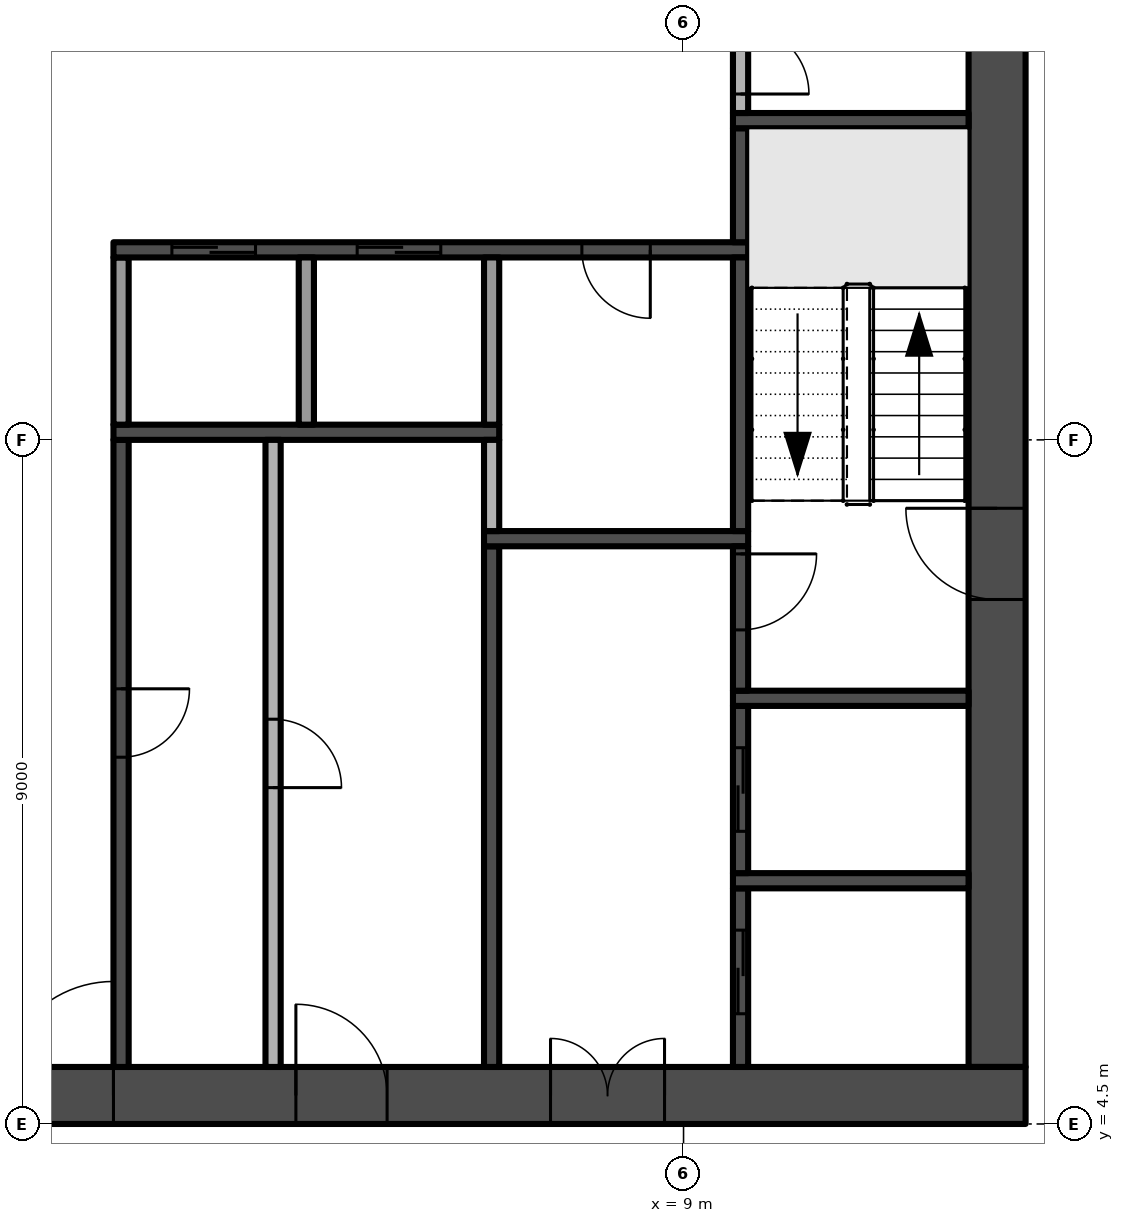
"""IFC4 building model, lengths in metres.
Left out: names, types, materials, properties, quantities, classifications, styles, units other than length and angle.
Written with IfcOpenShell. Run it as: python <this file> out.ifc"""

import sys

from ifc_helpers import new_model, si_unit, direction, frame, frame_2d, origin, place, context, subcontext, project, spatial, rectangle, extrude, element, fill, save


model = new_model("IFC4")
c1 = context("Model", 3, precision=1e-05, world=origin(), true_north=direction((0.0, 1.0)))
c2 = subcontext(c1, "Body", "Model", "MODEL_VIEW")
j1 = project(units=[si_unit("LENGTHUNIT", "METRE"), si_unit("PLANEANGLEUNIT", "RADIAN")], contexts=[c1])
p1 = place(None, origin())
s1 = spatial("IfcSite", under=j1, at=p1, CompositionType="ELEMENT")
p2 = place(p1, origin())
s2 = spatial("IfcBuilding", under=s1, at=p2, CompositionType="ELEMENT")
p3 = place(p2, frame((0.0, 0.0, 163.0)))
s3 = spatial("IfcBuildingStorey", under=s2, at=p3, CompositionType="ELEMENT", Elevation=163.0)
p4 = place(p3, frame((-13.5, 4.875, -0.3), z_axis=(0.0, 0.0, 1.0), x_axis=(1.0, 0.0, 0.0)))
e1 = element("IfcWall", 1, at=p4, inside=s3, PredefinedType="SHEAR", context=c2, shape_type="SweptSolid", body=[
    extrude(rectangle(XDim=27.0, YDim=0.75, at=frame_2d((13.5, 0.0))), origin(), (0.0, 0.0, 1.0), 3.8),
])
p5 = place(p4, frame((12.0, 0.0, 0.3)))
e2 = element("IfcOpeningElement", 2, at=p5, cuts=e1, PredefinedType="OPENING", context=c2, shape_type="SweptSolid", body=[
    extrude(rectangle(XDim=3.0, YDim=2.4, at=frame_2d((1.5, 1.2))), frame((0.0, 0.385, 0.0), z_axis=(0.0, -1.0, 0.0), x_axis=(1.0, 0.0, 0.0)), (0.0, 0.0, 1.0), 0.77),
])
p6 = place(p4, frame((4.9, 0.0, 0.3)))
e3 = element("IfcOpeningElement", 3, at=p6, cuts=e1, PredefinedType="OPENING", context=c2, shape_type="SweptSolid", body=[
    extrude(rectangle(XDim=1.2, YDim=2.2, at=frame_2d((0.6, 1.1))), frame((0.0, 0.385, 0.0), z_axis=(0.0, -1.0, 0.0), x_axis=(1.0, 0.0, 0.0)), (0.0, 0.0, 1.0), 0.77),
])
p7 = place(p4, frame((20.75, 0.0, 0.3)))
e4 = element("IfcOpeningElement", 4, at=p7, cuts=e1, PredefinedType="OPENING", context=c2, shape_type="SweptSolid", body=[
    extrude(rectangle(XDim=1.5, YDim=2.2, at=frame_2d((0.75, 1.1))), frame((0.0, 0.385, 0.0), z_axis=(0.0, -1.0, 0.0), x_axis=(1.0, 0.0, 0.0)), (0.0, 0.0, 1.0), 0.77),
])
p8 = place(p4, frame((17.4, 0.0, 0.3)))
e5 = element("IfcOpeningElement", 5, at=p8, cuts=e1, PredefinedType="OPENING", context=c2, shape_type="SweptSolid", body=[
    extrude(rectangle(XDim=1.2, YDim=2.2, at=frame_2d((0.6, 1.1))), frame((0.0, 0.385, 0.0), z_axis=(0.0, -1.0, 0.0), x_axis=(1.0, 0.0, 0.0)), (0.0, 0.0, 1.0), 0.77),
])
p9 = place(p3, frame((13.125, 5.25, -0.3), z_axis=(0.0, 0.0, 1.0), x_axis=(0.0, 1.0, 0.0)))
e6 = element("IfcWall", 6, at=p9, inside=s3, PredefinedType="SHEAR", context=c2, shape_type="SweptSolid", body=[
    extrude(rectangle(XDim=16.5, YDim=0.75, at=frame_2d((8.25, 0.0))), origin(), (0.0, 0.0, 1.0), 3.8),
])
p10 = place(p9, frame((6.15, 0.0, 0.3)))
e7 = element("IfcOpeningElement", 7, at=p10, cuts=e6, PredefinedType="OPENING", context=c2, shape_type="SweptSolid", body=[
    extrude(rectangle(XDim=1.2, YDim=2.2, at=frame_2d((0.6, 1.1))), frame((0.0, 0.385, 0.0), z_axis=(0.0, -1.0, 0.0), x_axis=(1.0, 0.0, 0.0)), (0.0, 0.0, 1.0), 0.77),
])
p11 = place(p3, frame((1.6, 13.5, 0.0), z_axis=(0.0, 0.0, 1.0), x_axis=(0.0, -1.0, 0.0)))
e8 = element("IfcWall", 8, at=p11, inside=s3, PredefinedType="SHEAR", context=c2, shape_type="SweptSolid", body=[
    extrude(rectangle(XDim=8.25, YDim=0.2, at=frame_2d((4.125, 0.0))), origin(), (0.0, 0.0, 1.0), 3.5),
])
p12 = place(p11, frame((3.275, 0.0, 0.0)))
e9 = element("IfcOpeningElement", 9, at=p12, cuts=e8, PredefinedType="OPENING", context=c2, shape_type="SweptSolid", body=[
    extrude(rectangle(XDim=0.9, YDim=2.1, at=frame_2d((0.45, 1.05))), frame((0.0, 0.11, 0.0), z_axis=(0.0, -1.0, 0.0), x_axis=(1.0, 0.0, 0.0)), (0.0, 0.0, 1.0), 0.22),
])
p13 = place(p3, frame((1.5, 13.6, 0.0), z_axis=(0.0, 0.0, 1.0), x_axis=(1.0, 0.0, 0.0)))
e10 = element("IfcWall", 10, at=p13, inside=s3, PredefinedType="SHEAR", context=c2, shape_type="SweptSolid", body=[
    extrude(rectangle(XDim=5.075, YDim=0.2, at=frame_2d((2.538, 0.0))), origin(), (0.0, 0.0, 1.0), 3.5),
])
p14 = place(p3, frame((1.6, 13.7, 0.0), z_axis=(0.0, 0.0, 1.0), x_axis=(0.0, 1.0, 0.0)))
e11 = element("IfcWall", 11, at=p14, inside=s3, PredefinedType="PARTITIONING", context=c2, shape_type="SweptSolid", body=[
    extrude(rectangle(XDim=2.2, YDim=0.2, at=frame_2d((1.1, 0.0))), origin(), (0.0, 0.0, 1.0), 3.5),
])
p15 = place(p3, frame((9.85, 16.0, 0.0), z_axis=(0.0, 0.0, 1.0), x_axis=(-1.0, 0.0, 0.0)))
e12 = element("IfcWall", 12, at=p15, inside=s3, PredefinedType="SHEAR", context=c2, shape_type="SweptSolid", body=[
    extrude(rectangle(XDim=8.35, YDim=0.2, at=frame_2d((4.175, 0.0))), origin(), (0.0, 0.0, 1.0), 3.5),
])
p16 = place(p15, frame((6.481, 0.0, 0.0)))
e13 = element("IfcOpeningElement", 13, at=p16, cuts=e12, PredefinedType="OPENING", context=c2, shape_type="SweptSolid", body=[
    extrude(rectangle(XDim=1.1, YDim=2.1, at=frame_2d((0.55, 1.05))), frame((0.0, 0.11, 0.0), z_axis=(0.0, -1.0, 0.0), x_axis=(1.0, 0.0, 0.0)), (0.0, 0.0, 1.0), 0.22),
])
p17 = place(p15, frame((4.044, 0.0, 0.0)))
e14 = element("IfcOpeningElement", 14, at=p17, cuts=e12, PredefinedType="OPENING", context=c2, shape_type="SweptSolid", body=[
    extrude(rectangle(XDim=1.1, YDim=2.1, at=frame_2d((0.55, 1.05))), frame((0.0, 0.11, 0.0), z_axis=(0.0, -1.0, 0.0), x_axis=(1.0, 0.0, 0.0)), (0.0, 0.0, 1.0), 0.22),
])
p18 = place(p15, frame((1.288, 0.0, 0.0)))
e15 = element("IfcOpeningElement", 15, at=p18, cuts=e12, PredefinedType="OPENING", context=c2, shape_type="SweptSolid", body=[
    extrude(rectangle(XDim=0.9, YDim=2.1, at=frame_2d((0.45, 1.05))), frame((0.0, 0.11, 0.0), z_axis=(0.0, -1.0, 0.0), x_axis=(1.0, 0.0, 0.0)), (0.0, 0.0, 1.0), 0.22),
])
p19 = place(p3, frame((3.6, 13.5, 0.0), z_axis=(0.0, 0.0, 1.0), x_axis=(0.0, -1.0, 0.0)))
e16 = element("IfcWall", 16, at=p19, inside=s3, PredefinedType="PARTITIONING", context=c2, shape_type="SweptSolid", body=[
    extrude(rectangle(XDim=8.25, YDim=0.2, at=frame_2d((4.125, 0.0))), origin(), (0.0, 0.0, 1.0), 3.5),
])
p20 = place(p19, frame((3.675, 0.0, 0.0)))
e17 = element("IfcOpeningElement", 17, at=p20, cuts=e16, PredefinedType="OPENING", context=c2, shape_type="SweptSolid", body=[
    extrude(rectangle(XDim=0.9, YDim=2.1, at=frame_2d((0.45, 1.05))), frame((0.0, 0.11, 0.0), z_axis=(0.0, -1.0, 0.0), x_axis=(1.0, 0.0, 0.0)), (0.0, 0.0, 1.0), 0.22),
])
p21 = place(p3, frame((4.037, 13.7, 0.0), z_axis=(0.0, 0.0, 1.0), x_axis=(0.0, 1.0, 0.0)))
e18 = element("IfcWall", 18, at=p21, inside=s3, PredefinedType="PARTITIONING", context=c2, shape_type="SweptSolid", body=[
    extrude(rectangle(XDim=2.2, YDim=0.2, at=frame_2d((1.1, 0.0))), origin(), (0.0, 0.0, 1.0), 3.5),
])
p22 = place(p3, frame((6.475, 5.25, 0.0), z_axis=(0.0, 0.0, 1.0), x_axis=(0.0, 1.0, 0.0)))
e19 = element("IfcWall", 19, at=p22, inside=s3, PredefinedType="SHEAR", context=c2, shape_type="SweptSolid", body=[
    extrude(rectangle(XDim=6.85, YDim=0.2, at=frame_2d((3.425, 0.0))), origin(), (0.0, 0.0, 1.0), 3.5),
])
p23 = place(p3, frame((6.375, 12.2, 0.0), z_axis=(0.0, 0.0, 1.0), x_axis=(1.0, 0.0, 0.0)))
e20 = element("IfcWall", 20, at=p23, inside=s3, PredefinedType="SHEAR", context=c2, shape_type="SweptSolid", body=[
    extrude(rectangle(XDim=3.475, YDim=0.2, at=frame_2d((1.738, 0.0))), origin(), (0.0, 0.0, 1.0), 3.5),
])
p24 = place(p3, frame((6.475, 12.3, 0.0), z_axis=(0.0, 0.0, 1.0), x_axis=(0.0, 1.0, 0.0)))
e21 = element("IfcWall", 21, at=p24, inside=s3, PredefinedType="PARTITIONING", context=c2, shape_type="SweptSolid", body=[
    extrude(rectangle(XDim=1.2, YDim=0.2, at=frame_2d((0.6, 0.0))), origin(), (0.0, 0.0, 1.0), 3.5),
])
p25 = place(p3, frame((6.475, 13.7, 0.0), z_axis=(0.0, 0.0, 1.0), x_axis=(0.0, 1.0, 0.0)))
e22 = element("IfcWall", 22, at=p25, inside=s3, PredefinedType="PARTITIONING", context=c2, shape_type="SweptSolid", body=[
    extrude(rectangle(XDim=2.2, YDim=0.2, at=frame_2d((1.1, 0.0))), origin(), (0.0, 0.0, 1.0), 3.5),
])
p26 = place(p3, frame((9.75, 5.25, 0.0), z_axis=(0.0, 0.0, 1.0), x_axis=(0.0, 1.0, 0.0)))
e23 = element("IfcWall", 23, at=p26, inside=s3, PredefinedType="SHEAR", context=c2, shape_type="SweptSolid", body=[
    extrude(rectangle(XDim=2.35, YDim=0.2, at=frame_2d((1.175, 0.0))), origin(), (0.0, 0.0, 1.0), 3.5),
])
p27 = place(p26, frame((0.7, 0.0, 0.0)))
e24 = element("IfcOpeningElement", 24, at=p27, cuts=e23, PredefinedType="OPENING", context=c2, shape_type="SweptSolid", body=[
    extrude(rectangle(XDim=1.1, YDim=2.1, at=frame_2d((0.55, 1.05))), frame((0.0, 0.11, 0.0), z_axis=(0.0, -1.0, 0.0), x_axis=(1.0, 0.0, 0.0)), (0.0, 0.0, 1.0), 0.22),
])
p28 = place(p3, frame((9.65, 7.7, 0.0), z_axis=(0.0, 0.0, 1.0), x_axis=(1.0, 0.0, 0.0)))
e25 = element("IfcWall", 25, at=p28, inside=s3, PredefinedType="SHEAR", context=c2, shape_type="SweptSolid", body=[
    extrude(rectangle(XDim=3.1, YDim=0.2, at=frame_2d((1.55, 0.0))), origin(), (0.0, 0.0, 1.0), 3.5),
])
p29 = place(p3, frame((9.75, 7.8, 0.0), z_axis=(0.0, 0.0, 1.0), x_axis=(0.0, 1.0, 0.0)))
e26 = element("IfcWall", 26, at=p29, inside=s3, PredefinedType="SHEAR", context=c2, shape_type="SweptSolid", body=[
    extrude(rectangle(XDim=2.2, YDim=0.2, at=frame_2d((1.1, 0.0))), origin(), (0.0, 0.0, 1.0), 3.5),
])
p30 = place(p29, frame((0.55, 0.0, 0.0)))
e27 = element("IfcOpeningElement", 27, at=p30, cuts=e26, PredefinedType="OPENING", context=c2, shape_type="SweptSolid", body=[
    extrude(rectangle(XDim=1.1, YDim=2.1, at=frame_2d((0.55, 1.05))), frame((0.0, 0.11, 0.0), z_axis=(0.0, -1.0, 0.0), x_axis=(1.0, 0.0, 0.0)), (0.0, 0.0, 1.0), 0.22),
])
p31 = place(p3, frame((9.65, 10.1, 0.0), z_axis=(0.0, 0.0, 1.0), x_axis=(1.0, 0.0, 0.0)))
e28 = element("IfcWall", 28, at=p31, inside=s3, PredefinedType="SHEAR", context=c2, shape_type="SweptSolid", body=[
    extrude(rectangle(XDim=3.1, YDim=0.2, at=frame_2d((1.55, 0.0))), origin(), (0.0, 0.0, 1.0), 3.5),
])
p32 = place(p3, frame((9.75, 12.1, 0.0), z_axis=(0.0, 0.0, 1.0), x_axis=(0.0, -1.0, 0.0)))
e29 = element("IfcWall", 29, at=p32, inside=s3, PredefinedType="SHEAR", context=c2, shape_type="SweptSolid", body=[
    extrude(rectangle(XDim=1.9, YDim=0.2, at=frame_2d((0.95, 0.0))), origin(), (0.0, 0.0, 1.0), 3.5),
])
p33 = place(p32, frame((0.1, 0.0, 0.0)))
e30 = element("IfcOpeningElement", 30, at=p33, cuts=e29, PredefinedType="OPENING", context=c2, shape_type="SweptSolid", body=[
    extrude(rectangle(XDim=1.0, YDim=2.2, at=frame_2d((0.5, 1.1))), frame((0.0, 0.11, 0.0), z_axis=(0.0, -1.0, 0.0), x_axis=(1.0, 0.0, 0.0)), (0.0, 0.0, 1.0), 0.22),
])
p34 = place(p3, frame((9.75, 12.3, 0.0), z_axis=(0.0, 0.0, 1.0), x_axis=(0.0, 1.0, 0.0)))
e31 = element("IfcWall", 31, at=p34, inside=s3, PredefinedType="SHEAR", context=c2, shape_type="SweptSolid", body=[
    extrude(rectangle(XDim=3.6, YDim=0.2, at=frame_2d((1.8, 0.0))), origin(), (0.0, 0.0, 1.0), 3.5),
])
p35 = place(p3, frame((9.75, 16.1, 0.0), z_axis=(0.0, 0.0, 1.0), x_axis=(0.0, 1.0, 0.0)))
e32 = element("IfcWall", 32, at=p35, inside=s3, PredefinedType="SHEAR", context=c2, shape_type="SweptSolid", body=[
    extrude(rectangle(XDim=1.5, YDim=0.2, at=frame_2d((0.75, 0.0))), origin(), (0.0, 0.0, 1.0), 3.5),
])
p36 = place(p3, frame((9.65, 17.7, 0.0), z_axis=(0.0, 0.0, 1.0), x_axis=(1.0, 0.0, 0.0)))
e33 = element("IfcWall", 33, at=p36, inside=s3, PredefinedType="SHEAR", context=c2, shape_type="SweptSolid", body=[
    extrude(rectangle(XDim=3.1, YDim=0.2, at=frame_2d((1.55, 0.0))), origin(), (0.0, 0.0, 1.0), 3.5),
])
p37 = place(p3, frame((9.75, 19.2, 0.0), z_axis=(0.0, 0.0, 1.0), x_axis=(0.0, -1.0, 0.0)))
e34 = element("IfcWall", 34, at=p37, inside=s3, PredefinedType="PARTITIONING", context=c2, shape_type="SweptSolid", body=[
    extrude(rectangle(XDim=1.4, YDim=0.2, at=frame_2d((0.7, 0.0))), origin(), (0.0, 0.0, 1.0), 3.5),
])
p38 = place(p37, frame((0.25, 0.0, 0.0)))
e35 = element("IfcOpeningElement", 35, at=p38, cuts=e34, PredefinedType="OPENING", context=c2, shape_type="SweptSolid", body=[
    extrude(rectangle(XDim=0.9, YDim=2.1, at=frame_2d((0.45, 1.05))), frame((0.0, 0.11, 0.0), z_axis=(0.0, -1.0, 0.0), x_axis=(1.0, 0.0, 0.0)), (0.0, 0.0, 1.0), 0.22),
])
p39 = place(p5, frame((3.0, 0.0, 0.0), z_axis=(0.0, 0.0, 1.0), x_axis=(-1.0, 0.0, 0.0)))
e36 = element("IfcDoor", 36, at=p39, inside=s3, OperationType="DOUBLE_DOOR_SINGLE_SWING", PredefinedType="DOOR", context=c2, shape_type="SweptSolid", body=[
    extrude(rectangle(XDim=3.0, YDim=2.4, at=frame_2d((1.5, 1.2))), frame((0.0, 0.025, 0.0), z_axis=(0.0, -1.0, 0.0), x_axis=(1.0, 0.0, 0.0)), (0.0, 0.0, 1.0), 0.05),
])
fill(e2, e36)
p40 = place(p10, frame((1.2, 0.0, 0.0), z_axis=(0.0, 0.0, 1.0), x_axis=(-1.0, 0.0, 0.0)))
e37 = element("IfcDoor", 37, at=p40, inside=s3, OperationType="SINGLE_SWING_LEFT", PredefinedType="DOOR", context=c2, shape_type="SweptSolid", body=[
    extrude(rectangle(XDim=1.2, YDim=2.2, at=frame_2d((0.6, 1.1))), frame((0.0, 0.025, 0.0), z_axis=(0.0, -1.0, 0.0), x_axis=(1.0, 0.0, 0.0)), (0.0, 0.0, 1.0), 0.05),
])
fill(e7, e37)
p41 = place(p7, frame((1.5, 0.0, 0.0), z_axis=(0.0, 0.0, 1.0), x_axis=(-1.0, 0.0, 0.0)))
e38 = element("IfcDoor", 38, at=p41, inside=s3, OperationType="DOUBLE_DOOR_SINGLE_SWING", PredefinedType="DOOR", context=c2, shape_type="SweptSolid", body=[
    extrude(rectangle(XDim=1.5, YDim=2.2, at=frame_2d((0.75, 1.1))), frame((0.0, 0.025, 0.0), z_axis=(0.0, -1.0, 0.0), x_axis=(1.0, 0.0, 0.0)), (0.0, 0.0, 1.0), 0.05),
])
fill(e4, e38)
p42 = place(p8, frame((1.2, 0.0, 0.0), z_axis=(0.0, 0.0, 1.0), x_axis=(-1.0, 0.0, 0.0)))
e39 = element("IfcDoor", 39, at=p42, inside=s3, OperationType="SINGLE_SWING_RIGHT", PredefinedType="DOOR", context=c2, shape_type="SweptSolid", body=[
    extrude(rectangle(XDim=1.2, YDim=2.2, at=frame_2d((0.6, 1.1))), frame((0.0, 0.025, 0.0), z_axis=(0.0, -1.0, 0.0), x_axis=(1.0, 0.0, 0.0)), (0.0, 0.0, 1.0), 0.05),
])
fill(e5, e39)
p43 = place(p33, origin())
e40 = element("IfcDoor", 40, at=p43, inside=s3, OperationType="SINGLE_SWING_LEFT", PredefinedType="DOOR", context=c2, shape_type="SweptSolid", body=[
    extrude(rectangle(XDim=1.0, YDim=2.2, at=frame_2d((0.5, 1.1))), frame((0.0, 0.025, 0.0), z_axis=(0.0, -1.0, 0.0), x_axis=(1.0, 0.0, 0.0)), (0.0, 0.0, 1.0), 0.05),
])
fill(e30, e40)
p44 = place(p16, origin())
e41 = element("IfcDoor", 41, at=p44, inside=s3, OperationType="SLIDING_TO_RIGHT", PredefinedType="DOOR", context=c2, shape_type="SweptSolid", body=[
    extrude(rectangle(XDim=1.1, YDim=2.1, at=frame_2d((0.55, 1.05))), frame((0.0, 0.025, 0.0), z_axis=(0.0, -1.0, 0.0), x_axis=(1.0, 0.0, 0.0)), (0.0, 0.0, 1.0), 0.05),
])
fill(e13, e41)
p45 = place(p17, origin())
e42 = element("IfcDoor", 42, at=p45, inside=s3, OperationType="SLIDING_TO_RIGHT", PredefinedType="DOOR", context=c2, shape_type="SweptSolid", body=[
    extrude(rectangle(XDim=1.1, YDim=2.1, at=frame_2d((0.55, 1.05))), frame((0.0, 0.025, 0.0), z_axis=(0.0, -1.0, 0.0), x_axis=(1.0, 0.0, 0.0)), (0.0, 0.0, 1.0), 0.05),
])
fill(e14, e42)
p46 = place(p27, origin())
e43 = element("IfcDoor", 43, at=p46, inside=s3, OperationType="SLIDING_TO_RIGHT", PredefinedType="DOOR", context=c2, shape_type="SweptSolid", body=[
    extrude(rectangle(XDim=1.1, YDim=2.1, at=frame_2d((0.55, 1.05))), frame((0.0, 0.025, 0.0), z_axis=(0.0, -1.0, 0.0), x_axis=(1.0, 0.0, 0.0)), (0.0, 0.0, 1.0), 0.05),
])
fill(e24, e43)
p47 = place(p30, origin())
e44 = element("IfcDoor", 44, at=p47, inside=s3, OperationType="SLIDING_TO_RIGHT", PredefinedType="DOOR", context=c2, shape_type="SweptSolid", body=[
    extrude(rectangle(XDim=1.1, YDim=2.1, at=frame_2d((0.55, 1.05))), frame((0.0, 0.025, 0.0), z_axis=(0.0, -1.0, 0.0), x_axis=(1.0, 0.0, 0.0)), (0.0, 0.0, 1.0), 0.05),
])
fill(e27, e44)
p48 = place(p12, origin())
e45 = element("IfcDoor", 45, at=p48, inside=s3, OperationType="SINGLE_SWING_LEFT", PredefinedType="DOOR", context=c2, shape_type="SweptSolid", body=[
    extrude(rectangle(XDim=0.9, YDim=2.1, at=frame_2d((0.45, 1.05))), frame((0.0, 0.025, 0.0), z_axis=(0.0, -1.0, 0.0), x_axis=(1.0, 0.0, 0.0)), (0.0, 0.0, 1.0), 0.05),
])
fill(e9, e45)
p49 = place(p18, origin())
e46 = element("IfcDoor", 46, at=p49, inside=s3, OperationType="SINGLE_SWING_LEFT", PredefinedType="DOOR", context=c2, shape_type="SweptSolid", body=[
    extrude(rectangle(XDim=0.9, YDim=2.1, at=frame_2d((0.45, 1.05))), frame((0.0, 0.025, 0.0), z_axis=(0.0, -1.0, 0.0), x_axis=(1.0, 0.0, 0.0)), (0.0, 0.0, 1.0), 0.05),
])
fill(e15, e46)
p50 = place(p38, origin())
e47 = element("IfcDoor", 47, at=p50, inside=s3, OperationType="SINGLE_SWING_RIGHT", PredefinedType="DOOR", context=c2, shape_type="SweptSolid", body=[
    extrude(rectangle(XDim=0.9, YDim=2.1, at=frame_2d((0.45, 1.05))), frame((0.0, 0.025, 0.0), z_axis=(0.0, -1.0, 0.0), x_axis=(1.0, 0.0, 0.0)), (0.0, 0.0, 1.0), 0.05),
])
fill(e35, e47)
p51 = place(p20, origin())
e48 = element("IfcDoor", 48, at=p51, inside=s3, OperationType="SINGLE_SWING_RIGHT", PredefinedType="DOOR", context=c2, shape_type="SweptSolid", body=[
    extrude(rectangle(XDim=0.9, YDim=2.1, at=frame_2d((0.45, 1.05))), frame((0.0, 0.025, 0.0), z_axis=(0.0, -1.0, 0.0), x_axis=(1.0, 0.0, 0.0)), (0.0, 0.0, 1.0), 0.05),
])
fill(e17, e48)
save(model, sys.argv[1])
